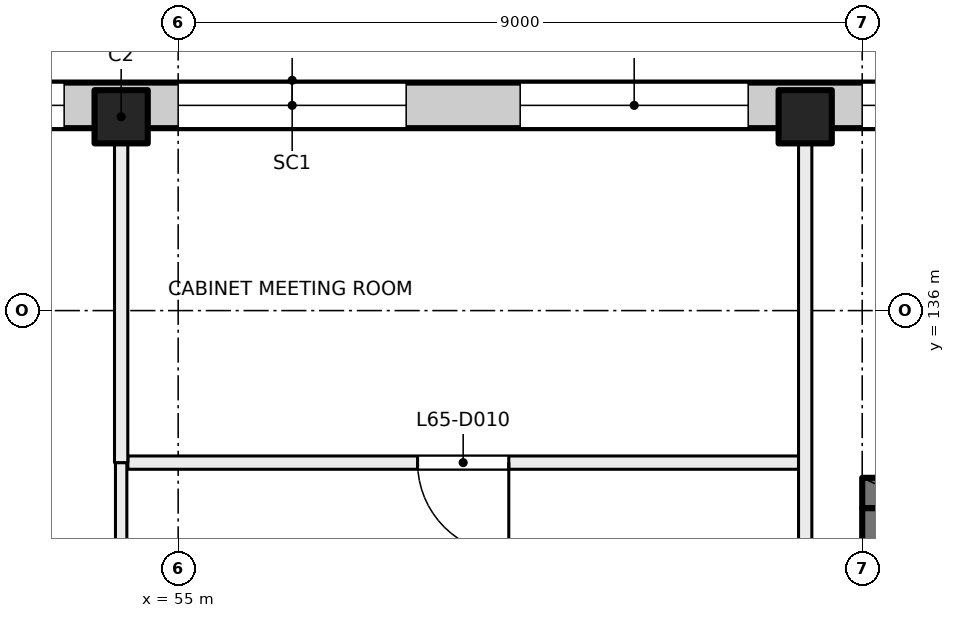
"""IFC4 building model, lengths in metres.
Left out: names, types, materials, properties, quantities, classifications, styles, units other than length and angle.
Written with IfcOpenShell. Run it as: python <this file> out.ifc"""

import sys

from ifc_helpers import new_model, si_unit, direction, frame, frame_2d, origin, origin_2d, place, context, subcontext, project, spatial, rectangle, extrude, element, fill, save


model = new_model("IFC4")
c1 = context("Model", 3, precision=1e-05, world=origin(), true_north=direction((0.0, 1.0)))
c2 = subcontext(c1, "Body", "Model", "MODEL_VIEW")
j1 = project(units=[si_unit("LENGTHUNIT", "METRE"), si_unit("PLANEANGLEUNIT", "RADIAN")], contexts=[c1])
p1 = place(None, origin())
s1 = spatial("IfcSite", under=j1, at=p1, CompositionType="ELEMENT")
p2 = place(p1, origin())
s2 = spatial("IfcBuilding", under=s1, at=p2, CompositionType="ELEMENT")
p3 = place(p2, frame((0.0, 0.0, 273.5)))
s3 = spatial("IfcBuildingStorey", under=s2, at=p3, CompositionType="ELEMENT", Elevation=273.5)
for number, where, z_axis, x_axis in (
    (1, (54.25, 138.55, 0.0), (0.0, 0.0, 1.0), (1.0, 0.0, 0.0)),
    (2, (63.25, 138.55, 0.0), (0.0, 0.0, 1.0), (1.0, 0.0, 0.0)),
):
    element("IfcColumn", number, at=place(p3, frame(where, z_axis=z_axis, x_axis=x_axis)), inside=s3, PredefinedType="COLUMN", context=c2, shape_type="SweptSolid", body=[
        extrude(rectangle(XDim=0.7, YDim=0.7, at=origin_2d()), origin(), (0.0, 0.0, 1.0), 4.0),
    ])
p4 = place(p3, frame((64.0, 133.6, 0.0), z_axis=(0.0, 0.0, 1.0), x_axis=(1.0, 0.0, 0.0)))
e3 = element("IfcWall", 3, at=p4, inside=s3, PredefinedType="SHEAR", context=c2, shape_type="SweptSolid", body=[
    extrude(rectangle(XDim=8.4, YDim=0.4, at=frame_2d((4.2, 0.0))), origin(), (0.0, 0.0, 1.0), 4.0),
])
p5 = place(p3, frame((64.2, 130.4, 0.0), z_axis=(0.0, 0.0, 1.0), x_axis=(0.0, 1.0, 0.0)))
e4 = element("IfcWall", 4, at=p5, inside=s3, PredefinedType="SHEAR", context=c2, shape_type="SweptSolid", body=[
    extrude(rectangle(XDim=3.0, YDim=0.4, at=frame_2d((1.5, 0.0))), origin(), (0.0, 0.0, 1.0), 4.0),
])
p6 = place(p3, frame((47.07, 138.7, 0.0), z_axis=(0.0, 0.0, 1.0), x_axis=(1.0, 0.0, 0.0)))
e5 = element("IfcWall", 5, at=p6, inside=s3, PredefinedType="SOLIDWALL", context=c2, shape_type="SweptSolid", body=[
    extrude(rectangle(XDim=43.91, YDim=0.6, at=frame_2d((21.955, 0.0))), origin(), (0.0, 0.0, 1.0), 3.625),
])
p7 = place(p6, frame((3.43, 0.0, 0.9)))
e6 = element("IfcOpeningElement", 6, at=p7, cuts=e5, PredefinedType="OPENING", context=c2, shape_type="SweptSolid", body=[
    extrude(rectangle(XDim=3.0, YDim=2.4, at=frame_2d((1.5, 1.2))), frame((0.0, 0.31, 0.0), z_axis=(0.0, -1.0, 0.0), x_axis=(1.0, 0.0, 0.0)), (0.0, 0.0, 1.0), 0.62),
])
p8 = place(p6, frame((7.93, 0.0, 0.9)))
e7 = element("IfcOpeningElement", 7, at=p8, cuts=e5, PredefinedType="OPENING", context=c2, shape_type="SweptSolid", body=[
    extrude(rectangle(XDim=3.0, YDim=2.4, at=frame_2d((1.5, 1.2))), frame((0.0, 0.31, 0.0), z_axis=(0.0, -1.0, 0.0), x_axis=(1.0, 0.0, 0.0)), (0.0, 0.0, 1.0), 0.62),
])
p9 = place(p6, frame((12.43, 0.0, 0.9)))
e8 = element("IfcOpeningElement", 8, at=p9, cuts=e5, PredefinedType="OPENING", context=c2, shape_type="SweptSolid", body=[
    extrude(rectangle(XDim=3.0, YDim=2.4, at=frame_2d((1.5, 1.2))), frame((0.0, 0.31, 0.0), z_axis=(0.0, -1.0, 0.0), x_axis=(1.0, 0.0, 0.0)), (0.0, 0.0, 1.0), 0.62),
])
p10 = place(p6, frame((16.93, 0.0, 0.9)))
e9 = element("IfcOpeningElement", 9, at=p10, cuts=e5, PredefinedType="OPENING", context=c2, shape_type="SweptSolid", body=[
    extrude(rectangle(XDim=3.0, YDim=2.4, at=frame_2d((1.5, 1.2))), frame((0.0, 0.31, 0.0), z_axis=(0.0, -1.0, 0.0), x_axis=(1.0, 0.0, 0.0)), (0.0, 0.0, 1.0), 0.62),
])
p11 = place(p6, frame((21.43, 0.0, 0.9)))
e10 = element("IfcOpeningElement", 10, at=p11, cuts=e5, PredefinedType="OPENING", context=c2, shape_type="SweptSolid", body=[
    extrude(rectangle(XDim=3.0, YDim=2.4, at=frame_2d((1.5, 1.2))), frame((0.0, 0.31, 0.0), z_axis=(0.0, -1.0, 0.0), x_axis=(1.0, 0.0, 0.0)), (0.0, 0.0, 1.0), 0.62),
])
p12 = place(p6, frame((25.93, 0.0, 0.9)))
e11 = element("IfcOpeningElement", 11, at=p12, cuts=e5, PredefinedType="OPENING", context=c2, shape_type="SweptSolid", body=[
    extrude(rectangle(XDim=3.0, YDim=2.4, at=frame_2d((1.5, 1.2))), frame((0.0, 0.31, 0.0), z_axis=(0.0, -1.0, 0.0), x_axis=(1.0, 0.0, 0.0)), (0.0, 0.0, 1.0), 0.62),
])
p13 = place(p6, frame((30.43, 0.0, 0.9)))
e12 = element("IfcOpeningElement", 12, at=p13, cuts=e5, PredefinedType="OPENING", context=c2, shape_type="SweptSolid", body=[
    extrude(rectangle(XDim=3.0, YDim=2.4, at=frame_2d((1.5, 1.2))), frame((0.0, 0.31, 0.0), z_axis=(0.0, -1.0, 0.0), x_axis=(1.0, 0.0, 0.0)), (0.0, 0.0, 1.0), 0.62),
])
p14 = place(p6, frame((34.93, 0.0, 0.9)))
e13 = element("IfcOpeningElement", 13, at=p14, cuts=e5, PredefinedType="OPENING", context=c2, shape_type="SweptSolid", body=[
    extrude(rectangle(XDim=3.0, YDim=2.4, at=frame_2d((1.5, 1.2))), frame((0.0, 0.31, 0.0), z_axis=(0.0, -1.0, 0.0), x_axis=(1.0, 0.0, 0.0)), (0.0, 0.0, 1.0), 0.62),
])
p15 = place(p6, frame((39.43, 0.0, 0.9)))
e14 = element("IfcOpeningElement", 14, at=p15, cuts=e5, PredefinedType="OPENING", context=c2, shape_type="SweptSolid", body=[
    extrude(rectangle(XDim=3.0, YDim=2.4, at=frame_2d((1.5, 1.2))), frame((0.0, 0.31, 0.0), z_axis=(0.0, -1.0, 0.0), x_axis=(1.0, 0.0, 0.0)), (0.0, 0.0, 1.0), 0.62),
])
p16 = place(p3, frame((54.25, 134.0, 0.0), z_axis=(0.0, 0.0, 1.0), x_axis=(0.0, -1.0, 0.0)))
e15 = element("IfcWall", 15, at=p16, inside=s3, PredefinedType="PARTITIONING", context=c2, shape_type="SweptSolid", body=[
    extrude(rectangle(XDim=12.65, YDim=0.15, at=frame_2d((6.325, 0.0))), origin(), (0.0, 0.0, 1.0), 3.625),
])
p17 = place(p16, frame((5.425, 0.0, 0.0)))
e16 = element("IfcOpeningElement", 16, at=p17, cuts=e15, PredefinedType="OPENING", context=c2, shape_type="SweptSolid", body=[
    extrude(rectangle(XDim=1.8, YDim=2.1, at=frame_2d((0.9, 1.05))), frame((0.0, 0.085, 0.0), z_axis=(0.0, -1.0, 0.0), x_axis=(1.0, 0.0, 0.0)), (0.0, 0.0, 1.0), 0.17),
])
p18 = place(p3, frame((63.162, 134.0, 0.0), z_axis=(0.0, 0.0, 1.0), x_axis=(-1.0, 0.0, 0.0)))
e17 = element("IfcWall", 17, at=p18, inside=s3, PredefinedType="PARTITIONING", context=c2, shape_type="SweptSolid", body=[
    extrude(rectangle(XDim=8.824, YDim=0.175, at=frame_2d((4.412, 0.0))), origin(), (0.0, 0.0, 1.0), 3.625),
])
p19 = place(p18, frame((3.812, 0.0, 0.0)))
e18 = element("IfcOpeningElement", 18, at=p19, cuts=e17, PredefinedType="OPENING", context=c2, shape_type="SweptSolid", body=[
    extrude(rectangle(XDim=1.2, YDim=2.1, at=frame_2d((0.6, 1.05))), frame((0.0, 0.097, 0.0), z_axis=(0.0, -1.0, 0.0), x_axis=(1.0, 0.0, 0.0)), (0.0, 0.0, 1.0), 0.195),
])
p20 = place(p3, frame((54.25, 138.4, 0.0), z_axis=(0.0, 0.0, 1.0), x_axis=(0.0, -1.0, 0.0)))
e19 = element("IfcWall", 19, at=p20, inside=s3, PredefinedType="PARTITIONING", context=c2, shape_type="SweptSolid", body=[
    extrude(rectangle(XDim=4.4, YDim=0.175, at=frame_2d((2.2, 0.0))), origin(), (0.0, 0.0, 1.0), 3.625),
])
p21 = place(p3, frame((63.25, 126.088, 0.0), z_axis=(0.0, 0.0, 1.0), x_axis=(0.0, 1.0, 0.0)))
e20 = element("IfcWall", 20, at=p21, inside=s3, PredefinedType="PARTITIONING", context=c2, shape_type="SweptSolid", body=[
    extrude(rectangle(XDim=12.312, YDim=0.175, at=frame_2d((6.156, 0.0))), origin(), (0.0, 0.0, 1.0), 3.625),
])
p22 = place(p21, frame((2.347, 0.0, 0.0)))
e21 = element("IfcOpeningElement", 21, at=p22, cuts=e20, PredefinedType="OPENING", context=c2, shape_type="SweptSolid", body=[
    extrude(rectangle(XDim=1.2, YDim=2.1, at=frame_2d((0.6, 1.05))), frame((0.0, 0.097, 0.0), z_axis=(0.0, -1.0, 0.0), x_axis=(1.0, 0.0, 0.0)), (0.0, 0.0, 1.0), 0.195),
])
p23 = place(p7, origin())
e22 = element("IfcWindow", 22, at=p23, inside=s3, PartitioningType="SINGLE_PANEL", PredefinedType="WINDOW", context=c2, shape_type="SweptSolid", body=[
    extrude(rectangle(XDim=3.0, YDim=2.4, at=frame_2d((1.5, 1.2))), frame((0.0, 0.03, 0.0), z_axis=(0.0, -1.0, 0.0), x_axis=(1.0, 0.0, 0.0)), (0.0, 0.0, 1.0), 0.06),
])
fill(e6, e22)
p24 = place(p8, origin())
e23 = element("IfcWindow", 23, at=p24, inside=s3, PartitioningType="SINGLE_PANEL", PredefinedType="WINDOW", context=c2, shape_type="SweptSolid", body=[
    extrude(rectangle(XDim=3.0, YDim=2.4, at=frame_2d((1.5, 1.2))), frame((0.0, 0.03, 0.0), z_axis=(0.0, -1.0, 0.0), x_axis=(1.0, 0.0, 0.0)), (0.0, 0.0, 1.0), 0.06),
])
fill(e7, e23)
p25 = place(p9, origin())
e24 = element("IfcWindow", 24, at=p25, inside=s3, PartitioningType="SINGLE_PANEL", PredefinedType="WINDOW", context=c2, shape_type="SweptSolid", body=[
    extrude(rectangle(XDim=3.0, YDim=2.4, at=frame_2d((1.5, 1.2))), frame((0.0, 0.03, 0.0), z_axis=(0.0, -1.0, 0.0), x_axis=(1.0, 0.0, 0.0)), (0.0, 0.0, 1.0), 0.06),
])
fill(e8, e24)
p26 = place(p10, origin())
e25 = element("IfcWindow", 25, at=p26, inside=s3, PartitioningType="SINGLE_PANEL", PredefinedType="WINDOW", context=c2, shape_type="SweptSolid", body=[
    extrude(rectangle(XDim=3.0, YDim=2.4, at=frame_2d((1.5, 1.2))), frame((0.0, 0.03, 0.0), z_axis=(0.0, -1.0, 0.0), x_axis=(1.0, 0.0, 0.0)), (0.0, 0.0, 1.0), 0.06),
])
fill(e9, e25)
p27 = place(p19, origin())
e26 = element("IfcDoor", 26, at=p27, inside=s3, OperationType="DOUBLE_DOOR_SINGLE_SWING", PredefinedType="DOOR", context=c2, shape_type="SweptSolid", body=[
    extrude(rectangle(XDim=1.2, YDim=2.1, at=frame_2d((0.6, 1.05))), frame((0.0, 0.025, 0.0), z_axis=(0.0, -1.0, 0.0), x_axis=(1.0, 0.0, 0.0)), (0.0, 0.0, 1.0), 0.05),
])
fill(e18, e26)
save(model, sys.argv[1])
